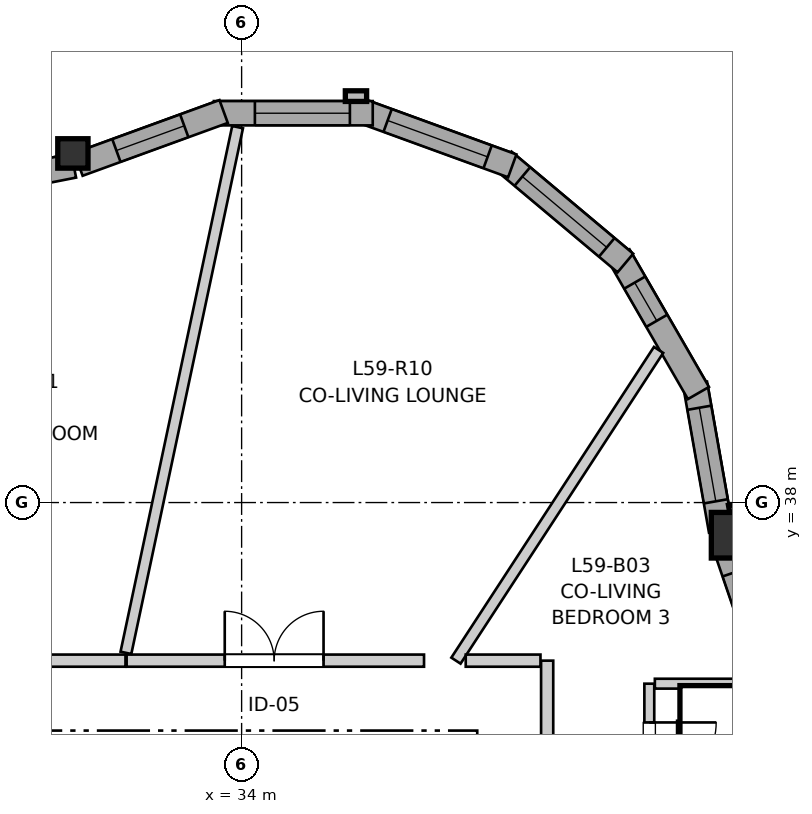
"""IFC4 building model, lengths in metres.
Left out: names, types, materials, properties, quantities, classifications, styles, units other than length and angle.
Written with IfcOpenShell. Run it as: python <this file> out.ifc"""

import sys

from ifc_helpers import new_model, si_unit, direction, frame, frame_2d, origin, origin_2d, place, context, subcontext, project, spatial, rectangle, i_section, extrude, source, transform, mapped, element, fill, save


model = new_model("IFC4")
c1 = context("Model", 3, precision=1e-05, world=origin(), true_north=direction((0.0, 1.0)))
c2 = subcontext(c1, "Body", "Model", "MODEL_VIEW")
j1 = project(units=[si_unit("LENGTHUNIT", "METRE"), si_unit("PLANEANGLEUNIT", "RADIAN")], contexts=[c1])
p1 = place(None, origin())
s1 = spatial("IfcSite", under=j1, at=p1, CompositionType="ELEMENT")
p2 = place(p1, origin())
s2 = spatial("IfcBuilding", under=s1, at=p2, CompositionType="ELEMENT")
p3 = place(p2, frame((0.0, 0.0, 198.8)))
s3 = spatial("IfcBuildingStorey", under=s2, at=p3, CompositionType="ELEMENT", Elevation=198.8)
m1 = source(origin(), c2, "Body", "SweptSolid", [
    extrude(rectangle(XDim=0.6, YDim=0.6, at=origin_2d()), origin(), (0.0, 0.0, 1.0), 2.96),
])
p4 = place(p3, frame((40.48, 37.57, 0.0), z_axis=(0.0, 0.0, 1.0), x_axis=(1.0, 0.0, 0.0)))
e1 = element("IfcColumn", 1, at=p4, inside=s3, PredefinedType="COLUMN", context=c2, shape_type="MappedRepresentation", body=[
    mapped(m1, transform((0.0, 0.0, 0.0), x_axis=(1.0, 0.0, 0.0), y_axis=(0.0, 1.0, 0.0), z_axis=(0.0, 0.0, 1.0), scale=1.0)),
])
m2 = source(origin(), c2, "Body", "SweptSolid", [
    extrude(i_section(OverallWidth=0.398, OverallDepth=0.387, WebThickness=0.019, FlangeThickness=0.03, FilletRadius=0.015, at=origin_2d()), origin(), (0.0, 0.0, 1.0), 2.96),
])
p5 = place(p3, frame((31.78, 42.593, 0.0), z_axis=(0.0, 0.0, 1.0), x_axis=(1.0, 0.0, 0.0)))
e2 = element("IfcColumn", 2, at=p5, inside=s3, PredefinedType="PILASTER", context=c2, shape_type="MappedRepresentation", body=[
    mapped(m2, transform((0.0, 0.0, 0.0), x_axis=(1.0, 0.0, 0.0), y_axis=(0.0, 1.0, 0.0), z_axis=(0.0, 0.0, 1.0), scale=1.0)),
])
p6 = place(p3, frame((41.132, 35.168, 0.0), z_axis=(0.0, 0.0, 1.0), x_axis=(-0.323654036362, 0.94617549363, 0.0)))
e3 = element("IfcWall", 3, at=p6, inside=s3, PredefinedType="SOLIDWALL", context=c2, shape_type="SweptSolid", body=[
    extrude(rectangle(XDim=2.394, YDim=0.32, at=frame_2d((1.197, 0.0))), origin(), (0.0, 0.0, 1.0), 2.58),
])
p7 = place(p6, frame((0.67, 0.0, 0.82)))
e4 = element("IfcOpeningElement", 4, at=p7, cuts=e3, PredefinedType="OPENING", context=c2, shape_type="SweptSolid", body=[
    extrude(rectangle(XDim=1.35, YDim=1.45, at=frame_2d((0.675, 0.725))), frame((0.0, 0.17, 0.0), z_axis=(0.0, -1.0, 0.0), x_axis=(1.0, 0.0, 0.0)), (0.0, 0.0, 1.0), 0.34),
])
p8 = place(p3, frame((40.307, 37.631, 0.0), z_axis=(0.0, 0.0, 1.0), x_axis=(-0.173671780312, 0.984803590937, 0.0)))
e5 = element("IfcWall", 5, at=p8, inside=s3, PredefinedType="SOLIDWALL", context=c2, shape_type="SweptSolid", body=[
    extrude(rectangle(XDim=1.962, YDim=0.32, at=frame_2d((0.981, 0.0))), origin(), (0.0, 0.0, 1.0), 2.58),
])
p9 = place(p8, frame((0.391, 0.0, 0.82)))
e6 = element("IfcOpeningElement", 6, at=p9, cuts=e5, PredefinedType="OPENING", context=c2, shape_type="SweptSolid", body=[
    extrude(rectangle(XDim=1.25, YDim=1.35, at=frame_2d((0.625, 0.675))), frame((0.0, 0.17, 0.0), z_axis=(0.0, -1.0, 0.0), x_axis=(1.0, 0.0, 0.0)), (0.0, 0.0, 1.0), 0.34),
])
p10 = place(p3, frame((40.01, 39.441, 0.0), z_axis=(0.0, 0.0, 1.0), x_axis=(-0.49990781971, 0.866078617559, 0.0)))
e7 = element("IfcWall", 7, at=p10, inside=s3, PredefinedType="SOLIDWALL", context=c2, shape_type="SweptSolid", body=[
    extrude(rectangle(XDim=2.09, YDim=0.32, at=frame_2d((1.045, 0.0))), origin(), (0.0, 0.0, 1.0), 2.58),
])
p11 = place(p10, frame((1.097, 0.0, 0.82)))
e8 = element("IfcOpeningElement", 8, at=p11, cuts=e7, PredefinedType="OPENING", context=c2, shape_type="SweptSolid", body=[
    extrude(rectangle(XDim=0.58, YDim=1.35, at=frame_2d((0.29, 0.675))), frame((0.0, 0.17, 0.0), z_axis=(0.0, -1.0, 0.0), x_axis=(1.0, 0.0, 0.0)), (0.0, 0.0, 1.0), 0.34),
])
p12 = place(p3, frame((39.049, 41.151, 0.0), z_axis=(0.0, 0.0, 1.0), x_axis=(-0.766082082368, 0.642742750308, 0.0)))
e9 = element("IfcWall", 9, at=p12, inside=s3, PredefinedType="SOLIDWALL", context=c2, shape_type="SweptSolid", body=[
    extrude(rectangle(XDim=2.09, YDim=0.32, at=frame_2d((1.045, 0.0))), origin(), (0.0, 0.0, 1.0), 2.58),
])
p13 = place(p12, frame((0.32, 0.0, 0.82)))
e10 = element("IfcOpeningElement", 10, at=p13, cuts=e9, PredefinedType="OPENING", context=c2, shape_type="SweptSolid", body=[
    extrude(rectangle(XDim=1.45, YDim=1.25, at=frame_2d((0.725, 0.625))), frame((0.0, 0.17, 0.0), z_axis=(0.0, -1.0, 0.0), x_axis=(1.0, 0.0, 0.0)), (0.0, 0.0, 1.0), 0.34),
])
p14 = place(p3, frame((37.561, 42.43, 0.0), z_axis=(0.0, 0.0, 1.0), x_axis=(-0.939711556618, 0.341968113072, 0.0)))
e11 = element("IfcWall", 11, at=p14, inside=s3, PredefinedType="SOLIDWALL", context=c2, shape_type="SweptSolid", body=[
    extrude(rectangle(XDim=2.09, YDim=0.32, at=frame_2d((1.045, 0.0))), origin(), (0.0, 0.0, 1.0), 2.58),
])
p15 = place(p14, frame((0.345, 0.0, 0.82)))
e12 = element("IfcOpeningElement", 12, at=p15, cuts=e11, PredefinedType="OPENING", context=c2, shape_type="SweptSolid", body=[
    extrude(rectangle(XDim=1.4, YDim=1.35, at=frame_2d((0.7, 0.675))), frame((0.0, 0.17, 0.0), z_axis=(0.0, -1.0, 0.0), x_axis=(1.0, 0.0, 0.0)), (0.0, 0.0, 1.0), 0.34),
])
p16 = place(p3, frame((35.725, 43.122, 0.0), z_axis=(0.0, 0.0, 1.0), x_axis=(-1.0, 0.0, 0.0)))
e13 = element("IfcWall", 13, at=p16, inside=s3, PredefinedType="SOLIDWALL", context=c2, shape_type="SweptSolid", body=[
    extrude(rectangle(XDim=2.09, YDim=0.32, at=frame_2d((1.045, 0.0))), origin(), (0.0, 0.0, 1.0), 2.58),
])
p17 = place(p16, frame((0.301, 0.0, 0.82)))
e14 = element("IfcOpeningElement", 14, at=p17, cuts=e13, PredefinedType="OPENING", context=c2, shape_type="SweptSolid", body=[
    extrude(rectangle(XDim=1.25, YDim=1.35, at=frame_2d((0.625, 0.675))), frame((0.0, 0.17, 0.0), z_axis=(0.0, -1.0, 0.0), x_axis=(1.0, 0.0, 0.0)), (0.0, 0.0, 1.0), 0.34),
])
p18 = place(p3, frame((33.763, 43.145, 0.0), z_axis=(0.0, 0.0, 1.0), x_axis=(-0.939691662178, -0.342022777067, 0.0)))
e15 = element("IfcWall", 15, at=p18, inside=s3, PredefinedType="SOLIDWALL", context=c2, shape_type="SweptSolid", body=[
    extrude(rectangle(XDim=2.032, YDim=0.32, at=frame_2d((1.016, 0.0))), origin(), (0.0, 0.0, 1.0), 2.58),
])
p19 = place(p18, frame((0.551, 0.0, 0.82)))
e16 = element("IfcOpeningElement", 16, at=p19, cuts=e15, PredefinedType="OPENING", context=c2, shape_type="SweptSolid", body=[
    extrude(rectangle(XDim=0.95, YDim=1.35, at=frame_2d((0.475, 0.675))), frame((0.0, 0.17, 0.0), z_axis=(0.0, -1.0, 0.0), x_axis=(1.0, 0.0, 0.0)), (0.0, 0.0, 1.0), 0.34),
])
p20 = place(p3, frame((31.791, 42.432, 0.0), z_axis=(0.0, 0.0, 1.0), x_axis=(-0.981230743763, -0.192837308358, 0.0)))
e17 = element("IfcWall", 17, at=p20, inside=s3, PredefinedType="SOLIDWALL", context=c2, shape_type="SweptSolid", body=[
    extrude(rectangle(XDim=2.464, YDim=0.32, at=frame_2d((1.232, 0.0))), origin(), (0.0, 0.0, 1.0), 2.58),
])
p21 = place(p20, frame((0.497, 0.0, 0.82)))
e18 = element("IfcOpeningElement", 18, at=p21, cuts=e17, PredefinedType="OPENING", context=c2, shape_type="SweptSolid", body=[
    extrude(rectangle(XDim=1.45, YDim=1.25, at=frame_2d((0.725, 0.625))), frame((0.0, 0.17, 0.0), z_axis=(0.0, -1.0, 0.0), x_axis=(1.0, 0.0, 0.0)), (0.0, 0.0, 1.0), 0.34),
])
p22 = place(p3, frame((27.156, 35.92, 0.0), z_axis=(0.0, 0.0, 1.0), x_axis=(1.0, 0.0, 0.0)))
e19 = element("IfcWall", 19, at=p22, inside=s3, PredefinedType="PARTITIONING", context=c2, shape_type="SweptSolid", body=[
    extrude(rectangle(XDim=5.316, YDim=0.16, at=frame_2d((2.658, 0.0))), origin(), (0.0, 0.0, 1.0), 2.628),
])
p23 = place(p22, frame((2.178, 0.0, 0.0)))
e20 = element("IfcOpeningElement", 20, at=p23, cuts=e19, PredefinedType="OPENING", context=c2, shape_type="SweptSolid", body=[
    extrude(rectangle(XDim=0.96, YDim=2.1, at=frame_2d((0.48, 1.05))), frame((0.0, 0.09, 0.0), z_axis=(0.0, -1.0, 0.0), x_axis=(1.0, 0.0, 0.0)), (0.0, 0.0, 1.0), 0.18),
])
p24 = place(p3, frame((32.487, 35.92, 0.0), z_axis=(0.0, 0.0, 1.0), x_axis=(1.0, 0.0, 0.0)))
e21 = element("IfcWall", 21, at=p24, inside=s3, PredefinedType="PARTITIONING", context=c2, shape_type="SweptSolid", body=[
    extrude(rectangle(XDim=3.913, YDim=0.16, at=frame_2d((1.957, 0.0))), origin(), (0.0, 0.0, 1.0), 2.628),
])
p25 = place(p24, frame((1.291, 0.0, 0.0)))
e22 = element("IfcOpeningElement", 22, at=p25, cuts=e21, PredefinedType="OPENING", context=c2, shape_type="SweptSolid", body=[
    extrude(rectangle(XDim=1.3, YDim=2.1, at=frame_2d((0.65, 1.05))), frame((0.0, 0.09, 0.0), z_axis=(0.0, -1.0, 0.0), x_axis=(1.0, 0.0, 0.0)), (0.0, 0.0, 1.0), 0.18),
])
p26 = place(p3, frame((39.364, 35.617, 0.0), z_axis=(0.0, 0.0, 1.0), x_axis=(0.0, -1.0, 0.0)))
e23 = element("IfcWall", 23, at=p26, inside=s3, PredefinedType="PARTITIONING", context=c2, shape_type="SweptSolid", body=[
    extrude(rectangle(XDim=1.9, YDim=0.13, at=frame_2d((0.95, 0.0))), origin(), (0.0, 0.0, 1.0), 2.598),
])
p27 = place(p26, frame((0.51, 0.0, 0.0)))
e24 = element("IfcOpeningElement", 24, at=p27, cuts=e23, PredefinedType="OPENING", context=c2, shape_type="SweptSolid", body=[
    extrude(rectangle(XDim=0.88, YDim=2.05, at=frame_2d((0.44, 1.025))), frame((0.0, 0.075, 0.0), z_axis=(0.0, -1.0, 0.0), x_axis=(1.0, 0.0, 0.0)), (0.0, 0.0, 1.0), 0.15),
])
p28 = place(p3, frame((32.478, 36.023, 0.0), z_axis=(0.0, 0.0, 1.0), x_axis=(0.207795571792, 0.978172275391, 0.0)))
e25 = element("IfcWall", 25, at=p28, inside=s3, PredefinedType="PARTITIONING", context=c2, shape_type="SweptSolid", body=[
    extrude(rectangle(XDim=7.071, YDim=0.145, at=frame_2d((3.535, 0.0))), origin(), (0.0, 0.0, 1.0), 2.96),
])
p29 = place(p3, frame((36.82, 35.92, 0.0), z_axis=(0.0, 0.0, 1.0), x_axis=(0.546222005159, 0.83764044857, 0.0)))
e26 = element("IfcWall", 26, at=p29, inside=s3, PredefinedType="PARTITIONING", context=c2, shape_type="SweptSolid", body=[
    extrude(rectangle(XDim=4.881, YDim=0.145, at=frame_2d((2.44, 0.0))), origin(), (0.0, 0.0, 1.0), 2.96),
])
p30 = place(p3, frame((38.02, 34.315, 0.0), z_axis=(0.0, 0.0, 1.0), x_axis=(0.0, 1.0, 0.0)))
e27 = element("IfcWall", 27, at=p30, inside=s3, PredefinedType="PARTITIONING", context=c2, shape_type="SweptSolid", body=[
    extrude(rectangle(XDim=1.605, YDim=0.16, at=frame_2d((0.802, 0.0))), origin(), (0.0, 0.0, 1.0), 2.628),
])
p31 = place(p3, frame((39.437, 35.617, 0.0), z_axis=(0.0, 0.0, 1.0), x_axis=(1.0, 0.0, 0.0)))
e28 = element("IfcWall", 28, at=p31, inside=s3, PredefinedType="PARTITIONING", context=c2, shape_type="SweptSolid", body=[
    extrude(rectangle(XDim=1.361, YDim=0.13, at=frame_2d((0.68, 0.0))), origin(), (0.0, 0.0, 1.0), 2.96),
])
p32 = place(p3, frame((36.949, 35.92, 0.0), z_axis=(0.0, 0.0, 1.0), x_axis=(1.0, 0.0, 0.0)))
e29 = element("IfcWall", 29, at=p32, inside=s3, PredefinedType="PARTITIONING", context=c2, shape_type="SweptSolid", body=[
    extrude(rectangle(XDim=0.983, YDim=0.16, at=frame_2d((0.492, 0.0))), origin(), (0.0, 0.0, 1.0), 2.96),
])
m3 = source(origin(), c2, "Body", "SweptSolid", [
    extrude(rectangle(XDim=1.35, YDim=1.45, at=frame_2d((0.675, 0.725))), frame((0.0, 0.03, 0.0), z_axis=(0.0, -1.0, 0.0), x_axis=(1.0, 0.0, 0.0)), (0.0, 0.0, 1.0), 0.06),
])
p33 = place(p7, origin())
e30 = element("IfcWindow", 30, at=p33, inside=s3, PartitioningType="SINGLE_PANEL", PredefinedType="WINDOW", context=c2, shape_type="MappedRepresentation", body=[
    mapped(m3, transform((0.0, 0.0, 0.0), x_axis=(1.0, 0.0, 0.0), y_axis=(0.0, 1.0, 0.0), z_axis=(0.0, 0.0, 1.0), scale=1.0)),
])
fill(e4, e30)
m4 = source(origin(), c2, "Body", "SweptSolid", [
    extrude(rectangle(XDim=1.25, YDim=1.35, at=frame_2d((0.625, 0.675))), frame((0.0, 0.03, 0.0), z_axis=(0.0, -1.0, 0.0), x_axis=(1.0, 0.0, 0.0)), (0.0, 0.0, 1.0), 0.06),
])
p34 = place(p9, origin())
e31 = element("IfcWindow", 31, at=p34, inside=s3, PartitioningType="SINGLE_PANEL", PredefinedType="WINDOW", context=c2, shape_type="MappedRepresentation", body=[
    mapped(m4, transform((0.0, 0.0, 0.0), x_axis=(1.0, 0.0, 0.0), y_axis=(0.0, 1.0, 0.0), z_axis=(0.0, 0.0, 1.0), scale=1.0)),
])
fill(e6, e31)
m5 = source(origin(), c2, "Body", "SweptSolid", [
    extrude(rectangle(XDim=0.58, YDim=1.35, at=frame_2d((0.29, 0.675))), frame((0.0, 0.03, 0.0), z_axis=(0.0, -1.0, 0.0), x_axis=(1.0, 0.0, 0.0)), (0.0, 0.0, 1.0), 0.06),
])
p35 = place(p11, origin())
e32 = element("IfcWindow", 32, at=p35, inside=s3, PartitioningType="SINGLE_PANEL", PredefinedType="WINDOW", context=c2, shape_type="MappedRepresentation", body=[
    mapped(m5, transform((0.0, 0.0, 0.0), x_axis=(1.0, 0.0, 0.0), y_axis=(0.0, 1.0, 0.0), z_axis=(0.0, 0.0, 1.0), scale=1.0)),
])
fill(e8, e32)
m6 = source(origin(), c2, "Body", "SweptSolid", [
    extrude(rectangle(XDim=1.45, YDim=1.25, at=frame_2d((0.725, 0.625))), frame((0.0, 0.03, 0.0), z_axis=(0.0, -1.0, 0.0), x_axis=(1.0, 0.0, 0.0)), (0.0, 0.0, 1.0), 0.06),
])
p36 = place(p13, origin())
e33 = element("IfcWindow", 33, at=p36, inside=s3, PartitioningType="SINGLE_PANEL", PredefinedType="WINDOW", context=c2, shape_type="MappedRepresentation", body=[
    mapped(m6, transform((0.0, 0.0, 0.0), x_axis=(1.0, 0.0, 0.0), y_axis=(0.0, 1.0, 0.0), z_axis=(0.0, 0.0, 1.0), scale=1.0)),
])
fill(e10, e33)
m7 = source(origin(), c2, "Body", "SweptSolid", [
    extrude(rectangle(XDim=1.4, YDim=1.35, at=frame_2d((0.7, 0.675))), frame((0.0, 0.03, 0.0), z_axis=(0.0, -1.0, 0.0), x_axis=(1.0, 0.0, 0.0)), (0.0, 0.0, 1.0), 0.06),
])
p37 = place(p15, origin())
e34 = element("IfcWindow", 34, at=p37, inside=s3, PartitioningType="SINGLE_PANEL", PredefinedType="WINDOW", context=c2, shape_type="MappedRepresentation", body=[
    mapped(m7, transform((0.0, 0.0, 0.0), x_axis=(1.0, 0.0, 0.0), y_axis=(0.0, 1.0, 0.0), z_axis=(0.0, 0.0, 1.0), scale=1.0)),
])
fill(e12, e34)
p38 = place(p17, origin())
e35 = element("IfcWindow", 35, at=p38, inside=s3, PartitioningType="SINGLE_PANEL", PredefinedType="WINDOW", context=c2, shape_type="MappedRepresentation", body=[
    mapped(m4, transform((0.0, 0.0, 0.0), x_axis=(1.0, 0.0, 0.0), y_axis=(0.0, 1.0, 0.0), z_axis=(0.0, 0.0, 1.0), scale=1.0)),
])
fill(e14, e35)
m8 = source(origin(), c2, "Body", "SweptSolid", [
    extrude(rectangle(XDim=0.95, YDim=1.35, at=frame_2d((0.475, 0.675))), frame((0.0, 0.03, 0.0), z_axis=(0.0, -1.0, 0.0), x_axis=(1.0, 0.0, 0.0)), (0.0, 0.0, 1.0), 0.06),
])
p39 = place(p19, origin())
e36 = element("IfcWindow", 36, at=p39, inside=s3, PartitioningType="SINGLE_PANEL", PredefinedType="WINDOW", context=c2, shape_type="MappedRepresentation", body=[
    mapped(m8, transform((0.0, 0.0, 0.0), x_axis=(1.0, 0.0, 0.0), y_axis=(0.0, 1.0, 0.0), z_axis=(0.0, 0.0, 1.0), scale=1.0)),
])
fill(e16, e36)
m9 = source(origin(), c2, "Body", "SweptSolid", [
    extrude(rectangle(XDim=1.3, YDim=2.1, at=frame_2d((0.65, 1.05))), frame((0.0, 0.025, 0.0), z_axis=(0.0, -1.0, 0.0), x_axis=(1.0, 0.0, 0.0)), (0.0, 0.0, 1.0), 0.05),
])
p40 = place(p25, origin())
e37 = element("IfcDoor", 37, at=p40, inside=s3, OperationType="DOUBLE_DOOR_SINGLE_SWING", PredefinedType="DOOR", context=c2, shape_type="MappedRepresentation", body=[
    mapped(m9, transform((0.0, 0.0, 0.0), x_axis=(1.0, 0.0, 0.0), y_axis=(0.0, 1.0, 0.0), z_axis=(0.0, 0.0, 1.0), scale=1.0)),
])
fill(e22, e37)
m10 = source(origin(), c2, "Body", "SweptSolid", [
    extrude(rectangle(XDim=0.88, YDim=2.05, at=frame_2d((0.44, 1.025))), frame((0.0, 0.025, 0.0), z_axis=(0.0, -1.0, 0.0), x_axis=(1.0, 0.0, 0.0)), (0.0, 0.0, 1.0), 0.05),
])
p41 = place(p27, origin())
e38 = element("IfcDoor", 38, at=p41, inside=s3, OperationType="SINGLE_SWING_LEFT", PredefinedType="DOOR", context=c2, shape_type="MappedRepresentation", body=[
    mapped(m10, transform((0.0, 0.0, 0.0), x_axis=(1.0, 0.0, 0.0), y_axis=(0.0, 1.0, 0.0), z_axis=(0.0, 0.0, 1.0), scale=1.0)),
])
fill(e24, e38)
save(model, sys.argv[1])
